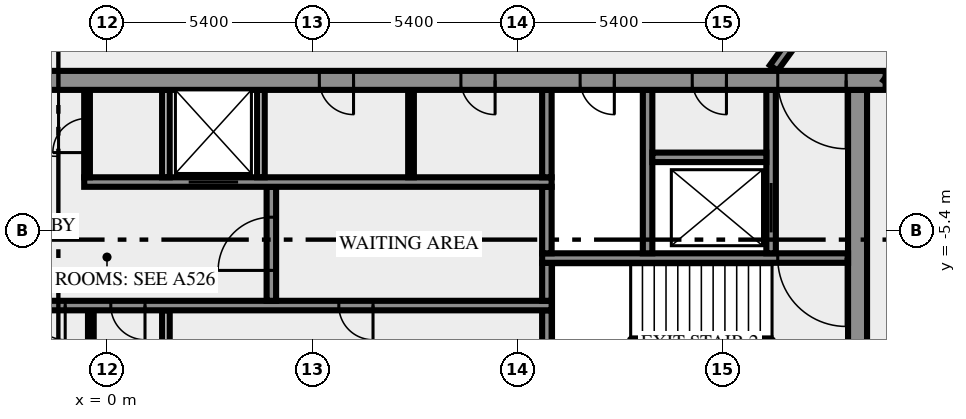
"""IFC4 building model, lengths in metres.
Left out: names, types, materials, properties, quantities, classifications, styles, units other than length and angle.
Written with IfcOpenShell. Run it as: python <this file> out.ifc"""

import sys

from ifc_helpers import new_model, si_unit, direction, frame, frame_2d, origin, place, context, subcontext, project, spatial, rectangle, extrude, element, fill, save


model = new_model("IFC4")
c1 = context("Model", 3, precision=1e-05, world=origin(), true_north=direction((0.0, 1.0)))
c2 = subcontext(c1, "Body", "Model", "MODEL_VIEW")
j1 = project(units=[si_unit("LENGTHUNIT", "METRE"), si_unit("PLANEANGLEUNIT", "RADIAN")], contexts=[c1])
p1 = place(None, origin())
s1 = spatial("IfcSite", under=j1, at=p1, CompositionType="ELEMENT")
p2 = place(p1, origin())
s2 = spatial("IfcBuilding", under=s1, at=p2, CompositionType="ELEMENT")
p3 = place(p2, frame((0.0, 0.0, 343.0)))
s3 = spatial("IfcBuildingStorey", under=s2, at=p3, CompositionType="ELEMENT", Elevation=343.0)
p4 = place(p3, frame((-0.425, -10.5, 0.0), z_axis=(0.0, 0.0, 1.0), x_axis=(0.0, 1.0, 0.0)))
e1 = element("IfcWall", 1, at=p4, inside=s3, PredefinedType="PARTITIONING", context=c2, shape_type="SweptSolid", body=[
    extrude(rectangle(XDim=3.0, YDim=0.15, at=frame_2d((1.5, 0.0))), origin(), (0.0, 0.0, 1.0), 3.65),
])
p5 = place(p3, frame((1.55, -10.5, 0.0), z_axis=(0.0, 0.0, 1.0), x_axis=(0.0, 1.0, 0.0)))
e2 = element("IfcWall", 2, at=p5, inside=s3, PredefinedType="SOLIDWALL", context=c2, shape_type="SweptSolid", body=[
    extrude(rectangle(XDim=3.0, YDim=0.2, at=frame_2d((1.5, 0.0))), origin(), (0.0, 0.0, 1.0), 3.65),
])
p6 = place(p3, frame((11.575, -10.5, 0.0), z_axis=(0.0, 0.0, 1.0), x_axis=(0.0, 1.0, 0.0)))
e3 = element("IfcWall", 3, at=p6, inside=s3, PredefinedType="SHEAR", context=c2, shape_type="SweptSolid", body=[
    extrude(rectangle(XDim=3.0, YDim=0.25, at=frame_2d((1.5, 0.0))), origin(), (0.0, 0.0, 1.0), 3.65),
])
p7 = place(p3, frame((19.75, -10.5, 0.0), z_axis=(0.0, 0.0, 1.0), x_axis=(0.0, 1.0, 0.0)))
e4 = element("IfcWall", 4, at=p7, inside=s3, PredefinedType="SHEAR", context=c2, shape_type="SweptSolid", body=[
    extrude(rectangle(XDim=8.8, YDim=0.5, at=frame_2d((4.4, 0.0))), origin(), (0.0, 0.0, 1.0), 3.65),
])
p8 = place(p3, frame((11.7, -7.375, 0.0), z_axis=(0.0, 0.0, 1.0), x_axis=(-1.0, 0.0, 0.0)))
e5 = element("IfcWall", 5, at=p8, inside=s3, PredefinedType="SHEAR", context=c2, shape_type="SweptSolid", body=[
    extrude(rectangle(XDim=23.4, YDim=0.25, at=frame_2d((11.7, 0.0))), origin(), (0.0, 0.0, 1.0), 3.65),
])
p9 = place(p8, frame((22.225, 0.0, 0.0)))
e6 = element("IfcOpeningElement", 6, at=p9, cuts=e5, PredefinedType="OPENING", context=c2, shape_type="SweptSolid", body=[
    extrude(rectangle(XDim=0.8, YDim=2.1, at=frame_2d((0.4, 1.05))), frame((0.0, 0.135, 0.0), z_axis=(0.0, -1.0, 0.0), x_axis=(1.0, 0.0, 0.0)), (0.0, 0.0, 1.0), 0.27),
])
p10 = place(p8, frame((20.2, 0.0, 0.0)))
e7 = element("IfcOpeningElement", 7, at=p10, cuts=e5, PredefinedType="OPENING", context=c2, shape_type="SweptSolid", body=[
    extrude(rectangle(XDim=1.1, YDim=2.1, at=frame_2d((0.55, 1.05))), frame((0.0, 0.135, 0.0), z_axis=(0.0, -1.0, 0.0), x_axis=(1.0, 0.0, 0.0)), (0.0, 0.0, 1.0), 0.27),
])
p11 = place(p8, frame((17.7, 0.0, 0.0)))
e8 = element("IfcOpeningElement", 8, at=p11, cuts=e5, PredefinedType="OPENING", context=c2, shape_type="SweptSolid", body=[
    extrude(rectangle(XDim=1.1, YDim=2.1, at=frame_2d((0.55, 1.05))), frame((0.0, 0.135, 0.0), z_axis=(0.0, -1.0, 0.0), x_axis=(1.0, 0.0, 0.0)), (0.0, 0.0, 1.0), 0.27),
])
p12 = place(p8, frame((15.975, 0.0, 0.0)))
e9 = element("IfcOpeningElement", 9, at=p12, cuts=e5, PredefinedType="OPENING", context=c2, shape_type="SweptSolid", body=[
    extrude(rectangle(XDim=0.8, YDim=2.1, at=frame_2d((0.4, 1.05))), frame((0.0, 0.135, 0.0), z_axis=(0.0, -1.0, 0.0), x_axis=(1.0, 0.0, 0.0)), (0.0, 0.0, 1.0), 0.27),
])
p13 = place(p8, frame((14.65, 0.0, 0.0)))
e10 = element("IfcOpeningElement", 10, at=p13, cuts=e5, PredefinedType="OPENING", context=c2, shape_type="SweptSolid", body=[
    extrude(rectangle(XDim=0.8, YDim=2.1, at=frame_2d((0.4, 1.05))), frame((0.0, 0.135, 0.0), z_axis=(0.0, -1.0, 0.0), x_axis=(1.0, 0.0, 0.0)), (0.0, 0.0, 1.0), 0.27),
])
p14 = place(p8, frame((12.8, 0.0, 0.0)))
e11 = element("IfcOpeningElement", 11, at=p14, cuts=e5, PredefinedType="OPENING", context=c2, shape_type="SweptSolid", body=[
    extrude(rectangle(XDim=0.9, YDim=2.1, at=frame_2d((0.45, 1.05))), frame((0.0, 0.135, 0.0), z_axis=(0.0, -1.0, 0.0), x_axis=(1.0, 0.0, 0.0)), (0.0, 0.0, 1.0), 0.27),
])
p15 = place(p8, frame((10.7, 0.0, 0.0)))
e12 = element("IfcOpeningElement", 12, at=p15, cuts=e5, PredefinedType="OPENING", context=c2, shape_type="SweptSolid", body=[
    extrude(rectangle(XDim=0.9, YDim=2.1, at=frame_2d((0.45, 1.05))), frame((0.0, 0.135, 0.0), z_axis=(0.0, -1.0, 0.0), x_axis=(1.0, 0.0, 0.0)), (0.0, 0.0, 1.0), 0.27),
])
p16 = place(p8, frame((4.7, 0.0, 0.0)))
e13 = element("IfcOpeningElement", 13, at=p16, cuts=e5, PredefinedType="OPENING", context=c2, shape_type="SweptSolid", body=[
    extrude(rectangle(XDim=0.9, YDim=2.1, at=frame_2d((0.45, 1.05))), frame((0.0, 0.135, 0.0), z_axis=(0.0, -1.0, 0.0), x_axis=(1.0, 0.0, 0.0)), (0.0, 0.0, 1.0), 0.27),
])
p17 = place(p3, frame((4.325, -7.25, 0.0), z_axis=(0.0, 0.0, 1.0), x_axis=(0.0, 1.0, 0.0)))
e14 = element("IfcWall", 14, at=p17, inside=s3, PredefinedType="SHEAR", context=c2, shape_type="SweptSolid", body=[
    extrude(rectangle(XDim=3.0, YDim=0.25, at=frame_2d((1.5, 0.0))), origin(), (0.0, 0.0, 1.0), 3.65),
])
p18 = place(p17, frame((0.8, 0.0, 0.0)))
e15 = element("IfcOpeningElement", 15, at=p18, cuts=e14, PredefinedType="OPENING", context=c2, shape_type="SweptSolid", body=[
    extrude(rectangle(XDim=1.4, YDim=2.1, at=frame_2d((0.7, 1.05))), frame((0.0, 0.135, 0.0), z_axis=(0.0, -1.0, 0.0), x_axis=(1.0, 0.0, 0.0)), (0.0, 0.0, 1.0), 0.27),
])
p19 = place(p3, frame((11.575, -7.25, 0.0), z_axis=(0.0, 0.0, 1.0), x_axis=(0.0, 1.0, 0.0)))
e16 = element("IfcWall", 16, at=p19, inside=s3, PredefinedType="SHEAR", context=c2, shape_type="SweptSolid", body=[
    extrude(rectangle(XDim=1.0, YDim=0.25, at=frame_2d((0.5, 0.0))), origin(), (0.0, 0.0, 1.0), 3.65),
])
p20 = place(p3, frame((19.5, -6.125, 0.0), z_axis=(0.0, 0.0, 1.0), x_axis=(-1.0, 0.0, 0.0)))
e17 = element("IfcWall", 17, at=p20, inside=s3, PredefinedType="SHEAR", context=c2, shape_type="SweptSolid", body=[
    extrude(rectangle(XDim=8.05, YDim=0.25, at=frame_2d((4.025, 0.0))), origin(), (0.0, 0.0, 1.0), 3.65),
])
p21 = place(p20, frame((0.05, 0.0, 0.0)))
e18 = element("IfcOpeningElement", 18, at=p21, cuts=e17, PredefinedType="OPENING", context=c2, shape_type="SweptSolid", body=[
    extrude(rectangle(XDim=1.8, YDim=2.1, at=frame_2d((0.9, 1.05))), frame((0.0, 0.135, 0.0), z_axis=(0.0, -1.0, 0.0), x_axis=(1.0, 0.0, 0.0)), (0.0, 0.0, 1.0), 0.27),
])
p22 = place(p3, frame((11.575, -6.0, 0.0), z_axis=(0.0, 0.0, 1.0), x_axis=(0.0, 1.0, 0.0)))
e19 = element("IfcWall", 19, at=p22, inside=s3, PredefinedType="SHEAR", context=c2, shape_type="SweptSolid", body=[
    extrude(rectangle(XDim=1.75, YDim=0.25, at=frame_2d((0.875, 0.0))), origin(), (0.0, 0.0, 1.0), 3.65),
])
p23 = place(p3, frame((14.225, -6.0, 0.0), z_axis=(0.0, 0.0, 1.0), x_axis=(0.0, 1.0, 0.0)))
e20 = element("IfcWall", 20, at=p23, inside=s3, PredefinedType="SHEAR", context=c2, shape_type="SweptSolid", body=[
    extrude(rectangle(XDim=4.3, YDim=0.25, at=frame_2d((2.15, 0.0))), origin(), (0.0, 0.0, 1.0), 3.65),
])
p24 = place(p3, frame((17.475, -6.0, 0.0), z_axis=(0.0, 0.0, 1.0), x_axis=(0.0, 1.0, 0.0)))
e21 = element("IfcWall", 21, at=p24, inside=s3, PredefinedType="SHEAR", context=c2, shape_type="SweptSolid", body=[
    extrude(rectangle(XDim=4.3, YDim=0.25, at=frame_2d((2.15, 0.0))), origin(), (0.0, 0.0, 1.0), 3.65),
])
p25 = place(p24, frame((0.55, 0.0, 0.0)))
e22 = element("IfcOpeningElement", 22, at=p25, cuts=e21, PredefinedType="OPENING", context=c2, shape_type="SweptSolid", body=[
    extrude(rectangle(XDim=1.3, YDim=2.1, at=frame_2d((0.65, 1.05))), frame((0.0, 0.135, 0.0), z_axis=(0.0, -1.0, 0.0), x_axis=(1.0, 0.0, 0.0)), (0.0, 0.0, 1.0), 0.27),
])
p26 = place(p3, frame((-0.6, -4.125, 0.0), z_axis=(0.0, 0.0, 1.0), x_axis=(1.0, 0.0, 0.0)))
e23 = element("IfcWall", 23, at=p26, inside=s3, PredefinedType="SHEAR", context=c2, shape_type="SweptSolid", body=[
    extrude(rectangle(XDim=12.3, YDim=0.25, at=frame_2d((6.15, 0.0))), origin(), (0.0, 0.0, 1.0), 3.65),
])
p27 = place(p26, frame((2.75, 0.0, 0.0)))
e24 = element("IfcOpeningElement", 24, at=p27, cuts=e23, PredefinedType="OPENING", context=c2, shape_type="SweptSolid", body=[
    extrude(rectangle(XDim=1.3, YDim=2.1, at=frame_2d((0.65, 1.05))), frame((0.0, 0.135, 0.0), z_axis=(0.0, -1.0, 0.0), x_axis=(1.0, 0.0, 0.0)), (0.0, 0.0, 1.0), 0.27),
])
p28 = place(p3, frame((-0.525, -4.0, 0.0), z_axis=(0.0, 0.0, 1.0), x_axis=(0.0, 1.0, 0.0)))
e25 = element("IfcWall", 25, at=p28, inside=s3, PredefinedType="PARTITIONING", context=c2, shape_type="SweptSolid", body=[
    extrude(rectangle(XDim=2.3, YDim=0.15, at=frame_2d((1.15, 0.0))), origin(), (0.0, 0.0, 1.0), 3.65),
])
p29 = place(p28, frame((0.65, 0.0, 0.0)))
e26 = element("IfcOpeningElement", 26, at=p29, cuts=e25, PredefinedType="OPENING", context=c2, shape_type="SweptSolid", body=[
    extrude(rectangle(XDim=0.9, YDim=2.1, at=frame_2d((0.45, 1.05))), frame((0.0, 0.085, 0.0), z_axis=(0.0, -1.0, 0.0), x_axis=(1.0, 0.0, 0.0)), (0.0, 0.0, 1.0), 0.17),
])
for number, where, z_axis, x_axis in (
    (27, (1.55, -4.0, 0.0), (0.0, 0.0, 1.0), (0.0, 1.0, 0.0)),
    (28, (4.05, -4.0, 0.0), (0.0, 0.0, 1.0), (0.0, 1.0, 0.0)),
):
    element("IfcWall", number, at=place(p3, frame(where, z_axis=z_axis, x_axis=x_axis)), inside=s3, PredefinedType="SOLIDWALL", context=c2, shape_type="SweptSolid", body=[
        extrude(rectangle(XDim=2.3, YDim=0.2, at=frame_2d((1.15, 0.0))), origin(), (0.0, 0.0, 1.0), 3.65),
    ])
p30 = place(p3, frame((8.0, -4.0, 0.0), z_axis=(0.0, 0.0, 1.0), x_axis=(0.0, 1.0, 0.0)))
e29 = element("IfcWall", 29, at=p30, inside=s3, PredefinedType="PARTITIONING", context=c2, shape_type="SweptSolid", body=[
    extrude(rectangle(XDim=2.3, YDim=0.15, at=frame_2d((1.15, 0.0))), origin(), (0.0, 0.0, 1.0), 3.65),
])
p31 = place(p3, frame((11.575, -4.0, 0.0), z_axis=(0.0, 0.0, 1.0), x_axis=(0.0, 1.0, 0.0)))
e30 = element("IfcWall", 30, at=p31, inside=s3, PredefinedType="SHEAR", context=c2, shape_type="SweptSolid", body=[
    extrude(rectangle(XDim=2.3, YDim=0.25, at=frame_2d((1.15, 0.0))), origin(), (0.0, 0.0, 1.0), 3.65),
])
p32 = place(p3, frame((14.35, -3.475, 0.0), z_axis=(0.0, 0.0, 1.0), x_axis=(1.0, 0.0, 0.0)))
e31 = element("IfcWall", 31, at=p32, inside=s3, PredefinedType="SHEAR", context=c2, shape_type="SweptSolid", body=[
    extrude(rectangle(XDim=3.0, YDim=0.25, at=frame_2d((1.5, 0.0))), origin(), (0.0, 0.0, 1.0), 3.65),
])
p33 = place(p3, frame((20.49, -1.45, 0.0), z_axis=(0.0, 0.0, 1.0), x_axis=(-1.0, 0.0, 0.0)))
e32 = element("IfcWall", 32, at=p33, inside=s3, PredefinedType="SHEAR", context=c2, shape_type="SweptSolid", body=[
    extrude(rectangle(XDim=40.98, YDim=0.5, at=frame_2d((20.49, 0.0))), origin(), (0.0, 0.0, 1.0), 3.65),
])
p34 = place(p33, frame((38.14, 0.0, 0.0)))
e33 = element("IfcOpeningElement", 33, at=p34, cuts=e32, PredefinedType="OPENING", context=c2, shape_type="SweptSolid", body=[
    extrude(rectangle(XDim=1.8, YDim=2.1, at=frame_2d((0.9, 1.05))), frame((0.0, 0.26, 0.0), z_axis=(0.0, -1.0, 0.0), x_axis=(1.0, 0.0, 0.0)), (0.0, 0.0, 1.0), 0.52),
])
p35 = place(p33, frame((36.728, 0.0, 0.0)))
e34 = element("IfcOpeningElement", 34, at=p35, cuts=e32, PredefinedType="OPENING", context=c2, shape_type="SweptSolid", body=[
    extrude(rectangle(XDim=0.8, YDim=2.1, at=frame_2d((0.4, 1.05))), frame((0.0, 0.26, 0.0), z_axis=(0.0, -1.0, 0.0), x_axis=(1.0, 0.0, 0.0)), (0.0, 0.0, 1.0), 0.52),
])
p36 = place(p33, frame((35.153, 0.0, 0.0)))
e35 = element("IfcOpeningElement", 35, at=p36, cuts=e32, PredefinedType="OPENING", context=c2, shape_type="SweptSolid", body=[
    extrude(rectangle(XDim=0.8, YDim=2.1, at=frame_2d((0.4, 1.05))), frame((0.0, 0.26, 0.0), z_axis=(0.0, -1.0, 0.0), x_axis=(1.0, 0.0, 0.0)), (0.0, 0.0, 1.0), 0.52),
])
p37 = place(p33, frame((32.94, 0.0, 0.0)))
e36 = element("IfcOpeningElement", 36, at=p37, cuts=e32, PredefinedType="OPENING", context=c2, shape_type="SweptSolid", body=[
    extrude(rectangle(XDim=0.9, YDim=2.1, at=frame_2d((0.45, 1.05))), frame((0.0, 0.26, 0.0), z_axis=(0.0, -1.0, 0.0), x_axis=(1.0, 0.0, 0.0)), (0.0, 0.0, 1.0), 0.52),
])
p38 = place(p33, frame((31.015, 0.0, 0.0)))
e37 = element("IfcOpeningElement", 37, at=p38, cuts=e32, PredefinedType="OPENING", context=c2, shape_type="SweptSolid", body=[
    extrude(rectangle(XDim=0.8, YDim=2.1, at=frame_2d((0.4, 1.05))), frame((0.0, 0.26, 0.0), z_axis=(0.0, -1.0, 0.0), x_axis=(1.0, 0.0, 0.0)), (0.0, 0.0, 1.0), 0.52),
])
p39 = place(p33, frame((24.765, 0.0, 0.0)))
e38 = element("IfcOpeningElement", 38, at=p39, cuts=e32, PredefinedType="OPENING", context=c2, shape_type="SweptSolid", body=[
    extrude(rectangle(XDim=0.8, YDim=2.1, at=frame_2d((0.4, 1.05))), frame((0.0, 0.26, 0.0), z_axis=(0.0, -1.0, 0.0), x_axis=(1.0, 0.0, 0.0)), (0.0, 0.0, 1.0), 0.52),
])
p40 = place(p33, frame((21.765, 0.0, 0.0)))
e39 = element("IfcOpeningElement", 39, at=p40, cuts=e32, PredefinedType="OPENING", context=c2, shape_type="SweptSolid", body=[
    extrude(rectangle(XDim=2.0, YDim=2.1, at=frame_2d((1.0, 1.05))), frame((0.0, 0.26, 0.0), z_axis=(0.0, -1.0, 0.0), x_axis=(1.0, 0.0, 0.0)), (0.0, 0.0, 1.0), 0.52),
])
p41 = place(p33, frame((14.002, 0.0, 0.0)))
e40 = element("IfcOpeningElement", 40, at=p41, cuts=e32, PredefinedType="OPENING", context=c2, shape_type="SweptSolid", body=[
    extrude(rectangle(XDim=0.9, YDim=2.1, at=frame_2d((0.45, 1.05))), frame((0.0, 0.26, 0.0), z_axis=(0.0, -1.0, 0.0), x_axis=(1.0, 0.0, 0.0)), (0.0, 0.0, 1.0), 0.52),
])
p42 = place(p33, frame((10.278, 0.0, 0.0)))
e41 = element("IfcOpeningElement", 41, at=p42, cuts=e32, PredefinedType="OPENING", context=c2, shape_type="SweptSolid", body=[
    extrude(rectangle(XDim=0.9, YDim=2.1, at=frame_2d((0.45, 1.05))), frame((0.0, 0.26, 0.0), z_axis=(0.0, -1.0, 0.0), x_axis=(1.0, 0.0, 0.0)), (0.0, 0.0, 1.0), 0.52),
])
p43 = place(p33, frame((7.14, 0.0, 0.0)))
e42 = element("IfcOpeningElement", 42, at=p43, cuts=e32, PredefinedType="OPENING", context=c2, shape_type="SweptSolid", body=[
    extrude(rectangle(XDim=0.9, YDim=2.1, at=frame_2d((0.45, 1.05))), frame((0.0, 0.26, 0.0), z_axis=(0.0, -1.0, 0.0), x_axis=(1.0, 0.0, 0.0)), (0.0, 0.0, 1.0), 0.52),
])
p44 = place(p33, frame((4.19, 0.0, 0.0)))
e43 = element("IfcOpeningElement", 43, at=p44, cuts=e32, PredefinedType="OPENING", context=c2, shape_type="SweptSolid", body=[
    extrude(rectangle(XDim=0.9, YDim=2.1, at=frame_2d((0.45, 1.05))), frame((0.0, 0.26, 0.0), z_axis=(0.0, -1.0, 0.0), x_axis=(1.0, 0.0, 0.0)), (0.0, 0.0, 1.0), 0.52),
])
p45 = place(p33, frame((1.04, 0.0, 0.0)))
e44 = element("IfcOpeningElement", 44, at=p45, cuts=e32, PredefinedType="OPENING", context=c2, shape_type="SweptSolid", body=[
    extrude(rectangle(XDim=1.8, YDim=2.1, at=frame_2d((0.9, 1.05))), frame((0.0, 0.26, 0.0), z_axis=(0.0, -1.0, 0.0), x_axis=(1.0, 0.0, 0.0)), (0.0, 0.0, 1.0), 0.52),
])
p46 = place(p3, frame((17.545, -1.125, 0.0), z_axis=(0.0, 0.0, 1.0), x_axis=(0.58779555165, 0.809009511354, 0.0)))
e45 = element("IfcWall", 45, at=p46, inside=s3, PredefinedType="SOLIDWALL", context=c2, shape_type="SweptSolid", body=[
    extrude(rectangle(XDim=18.103, YDim=0.25, at=frame_2d((9.052, 0.0))), origin(), (0.0, 0.0, 1.0), 3.65),
])
p47 = place(p46, frame((16.728, 0.0, 0.0)))
e46 = element("IfcOpeningElement", 46, at=p47, cuts=e45, PredefinedType="OPENING", context=c2, shape_type="SweptSolid", body=[
    extrude(rectangle(XDim=0.9, YDim=2.1, at=frame_2d((0.45, 1.05))), frame((0.0, 0.135, 0.0), z_axis=(0.0, -1.0, 0.0), x_axis=(1.0, 0.0, 0.0)), (0.0, 0.0, 1.0), 0.27),
])
p48 = place(p3, frame((30.183, 11.761, 0.0), z_axis=(0.0, 0.0, 1.0), x_axis=(-0.587781762867, -0.80901952958, 0.0)))
e47 = element("IfcWall", 47, at=p48, inside=s3, PredefinedType="SOLIDWALL", context=c2, shape_type="SweptSolid", body=[
    extrude(rectangle(XDim=16.42, YDim=0.25, at=frame_2d((8.21, 0.0))), origin(), (0.0, 0.0, 1.0), 3.65),
])
p49 = place(p48, frame((0.225, 0.0, 0.0)))
e48 = element("IfcOpeningElement", 48, at=p49, cuts=e47, PredefinedType="OPENING", context=c2, shape_type="SweptSolid", body=[
    extrude(rectangle(XDim=0.9, YDim=2.1, at=frame_2d((0.45, 1.05))), frame((0.0, 0.135, 0.0), z_axis=(0.0, -1.0, 0.0), x_axis=(1.0, 0.0, 0.0)), (0.0, 0.0, 1.0), 0.27),
])
p50 = place(p48, frame((6.605, 0.0, 0.0)))
e49 = element("IfcOpeningElement", 49, at=p50, cuts=e47, PredefinedType="OPENING", context=c2, shape_type="SweptSolid", body=[
    extrude(rectangle(XDim=0.9, YDim=2.1, at=frame_2d((0.45, 1.05))), frame((0.0, 0.135, 0.0), z_axis=(0.0, -1.0, 0.0), x_axis=(1.0, 0.0, 0.0)), (0.0, 0.0, 1.0), 0.27),
])
p51 = place(p14, origin())
e50 = element("IfcDoor", 50, at=p51, inside=s3, OperationType="SINGLE_SWING_RIGHT", PredefinedType="DOOR", context=c2, shape_type="SweptSolid", body=[
    extrude(rectangle(XDim=0.9, YDim=2.1, at=frame_2d((0.45, 1.05))), frame((0.0, 0.025, 0.0), z_axis=(0.0, -1.0, 0.0), x_axis=(1.0, 0.0, 0.0)), (0.0, 0.0, 1.0), 0.05),
])
fill(e11, e50)
p52 = place(p15, origin())
e51 = element("IfcDoor", 51, at=p52, inside=s3, OperationType="SINGLE_SWING_LEFT", PredefinedType="DOOR", context=c2, shape_type="SweptSolid", body=[
    extrude(rectangle(XDim=0.9, YDim=2.1, at=frame_2d((0.45, 1.05))), frame((0.0, 0.025, 0.0), z_axis=(0.0, -1.0, 0.0), x_axis=(1.0, 0.0, 0.0)), (0.0, 0.0, 1.0), 0.05),
])
fill(e12, e51)
p53 = place(p16, origin())
e52 = element("IfcDoor", 52, at=p53, inside=s3, OperationType="SINGLE_SWING_LEFT", PredefinedType="DOOR", context=c2, shape_type="SweptSolid", body=[
    extrude(rectangle(XDim=0.9, YDim=2.1, at=frame_2d((0.45, 1.05))), frame((0.0, 0.025, 0.0), z_axis=(0.0, -1.0, 0.0), x_axis=(1.0, 0.0, 0.0)), (0.0, 0.0, 1.0), 0.05),
])
fill(e13, e52)
p54 = place(p18, origin())
e53 = element("IfcDoor", 53, at=p54, inside=s3, OperationType="DOUBLE_DOOR_SINGLE_SWING", PredefinedType="DOOR", context=c2, shape_type="SweptSolid", body=[
    extrude(rectangle(XDim=1.4, YDim=2.1, at=frame_2d((0.7, 1.05))), frame((0.0, 0.025, 0.0), z_axis=(0.0, -1.0, 0.0), x_axis=(1.0, 0.0, 0.0)), (0.0, 0.0, 1.0), 0.05),
])
fill(e15, e53)
p55 = place(p21, origin())
e54 = element("IfcDoor", 54, at=p55, inside=s3, OperationType="DOUBLE_DOOR_SINGLE_SWING", PredefinedType="DOOR", context=c2, shape_type="SweptSolid", body=[
    extrude(rectangle(XDim=1.8, YDim=2.1, at=frame_2d((0.9, 1.05))), frame((0.0, 0.025, 0.0), z_axis=(0.0, -1.0, 0.0), x_axis=(1.0, 0.0, 0.0)), (0.0, 0.0, 1.0), 0.05),
])
fill(e18, e54)
p56 = place(p25, origin())
e55 = element("IfcDoor", 55, at=p56, inside=s3, OperationType="DOUBLE_DOOR_SLIDING", PredefinedType="DOOR", context=c2, shape_type="SweptSolid", body=[
    extrude(rectangle(XDim=1.3, YDim=2.1, at=frame_2d((0.65, 1.05))), frame((0.0, 0.025, 0.0), z_axis=(0.0, -1.0, 0.0), x_axis=(1.0, 0.0, 0.0)), (0.0, 0.0, 1.0), 0.05),
])
fill(e22, e55)
p57 = place(p27, origin())
e56 = element("IfcDoor", 56, at=p57, inside=s3, OperationType="DOUBLE_DOOR_SLIDING", PredefinedType="DOOR", context=c2, shape_type="SweptSolid", body=[
    extrude(rectangle(XDim=1.3, YDim=2.1, at=frame_2d((0.65, 1.05))), frame((0.0, 0.025, 0.0), z_axis=(0.0, -1.0, 0.0), x_axis=(1.0, 0.0, 0.0)), (0.0, 0.0, 1.0), 0.05),
])
fill(e24, e56)
p58 = place(p29, origin())
e57 = element("IfcDoor", 57, at=p58, inside=s3, OperationType="SINGLE_SWING_LEFT", PredefinedType="DOOR", context=c2, shape_type="SweptSolid", body=[
    extrude(rectangle(XDim=0.9, YDim=2.1, at=frame_2d((0.45, 1.05))), frame((0.0, 0.025, 0.0), z_axis=(0.0, -1.0, 0.0), x_axis=(1.0, 0.0, 0.0)), (0.0, 0.0, 1.0), 0.05),
])
fill(e26, e57)
p59 = place(p40, origin())
e58 = element("IfcDoor", 58, at=p59, inside=s3, OperationType="DOUBLE_DOOR_SINGLE_SWING", PredefinedType="DOOR", context=c2, shape_type="SweptSolid", body=[
    extrude(rectangle(XDim=2.0, YDim=2.1, at=frame_2d((1.0, 1.05))), frame((0.0, 0.025, 0.0), z_axis=(0.0, -1.0, 0.0), x_axis=(1.0, 0.0, 0.0)), (0.0, 0.0, 1.0), 0.05),
])
fill(e39, e58)
p60 = place(p41, origin())
e59 = element("IfcDoor", 59, at=p60, inside=s3, OperationType="SINGLE_SWING_LEFT", PredefinedType="DOOR", context=c2, shape_type="SweptSolid", body=[
    extrude(rectangle(XDim=0.9, YDim=2.1, at=frame_2d((0.45, 1.05))), frame((0.0, 0.025, 0.0), z_axis=(0.0, -1.0, 0.0), x_axis=(1.0, 0.0, 0.0)), (0.0, 0.0, 1.0), 0.05),
])
fill(e40, e59)
p61 = place(p42, origin())
e60 = element("IfcDoor", 60, at=p61, inside=s3, OperationType="SINGLE_SWING_LEFT", PredefinedType="DOOR", context=c2, shape_type="SweptSolid", body=[
    extrude(rectangle(XDim=0.9, YDim=2.1, at=frame_2d((0.45, 1.05))), frame((0.0, 0.025, 0.0), z_axis=(0.0, -1.0, 0.0), x_axis=(1.0, 0.0, 0.0)), (0.0, 0.0, 1.0), 0.05),
])
fill(e41, e60)
p62 = place(p43, origin())
e61 = element("IfcDoor", 61, at=p62, inside=s3, OperationType="SINGLE_SWING_LEFT", PredefinedType="DOOR", context=c2, shape_type="SweptSolid", body=[
    extrude(rectangle(XDim=0.9, YDim=2.1, at=frame_2d((0.45, 1.05))), frame((0.0, 0.025, 0.0), z_axis=(0.0, -1.0, 0.0), x_axis=(1.0, 0.0, 0.0)), (0.0, 0.0, 1.0), 0.05),
])
fill(e42, e61)
p63 = place(p44, origin())
e62 = element("IfcDoor", 62, at=p63, inside=s3, OperationType="SINGLE_SWING_LEFT", PredefinedType="DOOR", context=c2, shape_type="SweptSolid", body=[
    extrude(rectangle(XDim=0.9, YDim=2.1, at=frame_2d((0.45, 1.05))), frame((0.0, 0.025, 0.0), z_axis=(0.0, -1.0, 0.0), x_axis=(1.0, 0.0, 0.0)), (0.0, 0.0, 1.0), 0.05),
])
fill(e43, e62)
p64 = place(p45, origin())
e63 = element("IfcDoor", 63, at=p64, inside=s3, OperationType="DOUBLE_DOOR_SINGLE_SWING", PredefinedType="DOOR", context=c2, shape_type="SweptSolid", body=[
    extrude(rectangle(XDim=1.8, YDim=2.1, at=frame_2d((0.9, 1.05))), frame((0.0, 0.025, 0.0), z_axis=(0.0, -1.0, 0.0), x_axis=(1.0, 0.0, 0.0)), (0.0, 0.0, 1.0), 0.05),
])
fill(e44, e63)
save(model, sys.argv[1])
